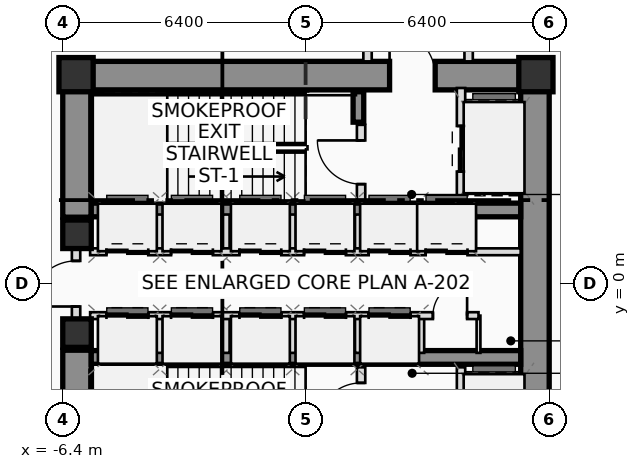
"""IFC4 building model, lengths in metres.
Left out: names, types, materials, properties, quantities, classifications, styles, units other than length and angle.
Written with IfcOpenShell. Run it as: python <this file> out.ifc"""

import sys

from ifc_helpers import new_model, si_unit, direction, frame, frame_2d, origin, origin_2d, place, context, subcontext, project, spatial, rectangle, extrude, source, transform, mapped, element, fill, save


model = new_model("IFC4")
c1 = context("Model", 3, precision=1e-05, world=origin(), true_north=direction((0.0, 1.0)))
c2 = subcontext(c1, "Body", "Model", "MODEL_VIEW")
j1 = project(units=[si_unit("LENGTHUNIT", "METRE"), si_unit("PLANEANGLEUNIT", "RADIAN")], contexts=[c1])
p1 = place(None, origin())
s1 = spatial("IfcSite", under=j1, at=p1, CompositionType="ELEMENT")
p2 = place(p1, origin())
s2 = spatial("IfcBuilding", under=s1, at=p2, CompositionType="ELEMENT")
p3 = place(p2, origin())
s3 = spatial("IfcBuildingStorey", under=s2, at=p3, CompositionType="ELEMENT", Elevation=0.0)
m1 = source(origin(), c2, "Body", "SweptSolid", [
    extrude(rectangle(XDim=0.9, YDim=0.9, at=origin_2d()), origin(), (0.0, 0.0, 1.0), 4.5),
])
for number, where, z_axis, x_axis in (
    (1, (6.05, 5.5, 0.0), (0.0, 0.0, 1.0), (1.0, 0.0, 0.0)),
    (2, (-6.05, 5.5, 0.0), (0.0, 0.0, 1.0), (1.0, 0.0, 0.0)),
):
    element("IfcColumn", number, at=place(p3, frame(where, z_axis=z_axis, x_axis=x_axis)), inside=s3, PredefinedType="COLUMN", context=c2, shape_type="MappedRepresentation", body=[
        mapped(m1, transform((0.0, 0.0, 0.0), scale=1.0)),
    ])
p4 = place(p3, frame((-6.4, 5.475, 0.0), z_axis=(0.0, 0.0, 1.0), x_axis=(1.0, 0.0, 0.0)))
e3 = element("IfcWall", 3, at=p4, inside=s3, PredefinedType="SHEAR", context=c2, shape_type="SweptSolid", body=[
    extrude(rectangle(XDim=12.8, YDim=0.75, at=frame_2d((6.4, 0.0))), origin(), (0.0, 0.0, 1.0), 4.5),
])
p5 = place(p4, frame((8.6, 0.0, 0.0)))
e4 = element("IfcOpeningElement", 4, at=p5, cuts=e3, PredefinedType="OPENING", context=c2, shape_type="SweptSolid", body=[
    extrude(rectangle(XDim=1.2, YDim=2.2, at=frame_2d((0.6, 1.1))), frame((0.0, 0.385, 0.0), z_axis=(0.0, -1.0, 0.0), x_axis=(1.0, 0.0, 0.0)), (0.0, 0.0, 1.0), 0.77),
])
p6 = place(p3, frame((6.025, -5.1, 0.0), z_axis=(0.0, 0.0, 1.0), x_axis=(0.0, 1.0, 0.0)))
e5 = element("IfcWall", 5, at=p6, inside=s3, PredefinedType="SHEAR", context=c2, shape_type="SweptSolid", body=[
    extrude(rectangle(XDim=10.2, YDim=0.75, at=frame_2d((5.1, 0.0))), origin(), (0.0, 0.0, 1.0), 4.5),
])
for number, where, z_axis, x_axis in (
    (6, (-6.025, -5.1, 0.0), (0.0, 0.0, 1.0), (0.0, 1.0, 0.0)),
    (7, (-6.025, 1.75, 0.0), (0.0, 0.0, 1.0), (0.0, 1.0, 0.0)),
):
    element("IfcWall", number, at=place(p3, frame(where, z_axis=z_axis, x_axis=x_axis)), inside=s3, PredefinedType="SHEAR", context=c2, shape_type="SweptSolid", body=[
        extrude(rectangle(XDim=3.35, YDim=0.75, at=frame_2d((1.675, 0.0))), origin(), (0.0, 0.0, 1.0), 4.5),
    ])
for number, where, z_axis, x_axis in (
    (8, (-5.65, 1.94, 0.0), (0.0, 0.0, 1.0), (1.0, 0.0, 0.0)),
    (9, (-5.65, -1.94, 0.0), (0.0, 0.0, 1.0), (1.0, 0.0, 0.0)),
):
    element("IfcWall", number, at=place(p3, frame(where, z_axis=z_axis, x_axis=x_axis)), inside=s3, PredefinedType="SHEAR", context=c2, shape_type="SweptSolid", body=[
        extrude(rectangle(XDim=11.3, YDim=0.36, at=frame_2d((5.65, 0.0))), origin(), (0.0, 0.0, 1.0), 4.5),
    ])
p7 = place(p3, frame((-5.52, 2.3, 0.0), z_axis=(0.0, 0.0, 1.0), x_axis=(0.0, 1.0, 0.0)))
e10 = element("IfcWall", 10, at=p7, inside=s3, PredefinedType="SHEAR", context=c2, shape_type="SweptSolid", body=[
    extrude(rectangle(XDim=2.75, YDim=0.28, at=frame_2d((1.375, 0.0))), origin(), (0.0, 0.0, 1.0), 4.5),
])
p8 = place(p3, frame((1.38, 4.25, 0.0), z_axis=(0.0, 0.0, 1.0), x_axis=(0.0, 1.0, 0.0)))
e11 = element("IfcWall", 11, at=p8, inside=s3, PredefinedType="SHEAR", context=c2, shape_type="SweptSolid", body=[
    extrude(rectangle(XDim=0.8, YDim=0.28, at=frame_2d((0.4, 0.0))), origin(), (0.0, 0.0, 1.0), 4.5),
])
p9 = place(p3, frame((-5.52, -5.05, 0.0), z_axis=(0.0, 0.0, 1.0), x_axis=(0.0, 1.0, 0.0)))
e12 = element("IfcWall", 12, at=p9, inside=s3, PredefinedType="SHEAR", context=c2, shape_type="SweptSolid", body=[
    extrude(rectangle(XDim=2.75, YDim=0.28, at=frame_2d((1.375, 0.0))), origin(), (0.0, 0.0, 1.0), 4.5),
])
m2 = source(origin(), c2, "Body", "SweptSolid", [
    extrude(rectangle(XDim=0.75, YDim=0.75, at=origin_2d()), origin(), (0.0, 0.0, 1.0), 4.5),
])
for number, where, z_axis, x_axis in (
    (13, (-6.025, -1.3, 0.0), (0.0, 0.0, 1.0), (1.0, 0.0, 0.0)),
    (14, (-6.025, 1.3, 0.0), (0.0, 0.0, 1.0), (1.0, 0.0, 0.0)),
):
    element("IfcColumn", number, at=place(p3, frame(where, z_axis=z_axis, x_axis=x_axis)), inside=s3, PredefinedType="COLUMN", context=c2, shape_type="MappedRepresentation", body=[
        mapped(m2, transform((0.0, 0.0, 0.0), scale=1.0)),
    ])
p10 = place(p3, frame((-6.05, -0.95, 0.0), z_axis=(0.0, 0.0, 1.0), x_axis=(0.0, 1.0, 0.0)))
e15 = element("IfcWall", 15, at=p10, inside=s3, PredefinedType="PLUMBINGWALL", context=c2, shape_type="SweptSolid", body=[
    extrude(rectangle(XDim=1.9, YDim=0.22, at=frame_2d((0.95, 0.0))), origin(), (0.0, 0.0, 1.0), 3.15),
])
p11 = place(p10, frame((0.35, 0.0, 0.0)))
e16 = element("IfcOpeningElement", 16, at=p11, cuts=e15, PredefinedType="OPENING", context=c2, shape_type="SweptSolid", body=[
    extrude(rectangle(XDim=1.2, YDim=2.2, at=frame_2d((0.6, 1.1))), frame((0.0, 0.12, 0.0), z_axis=(0.0, -1.0, 0.0), x_axis=(1.0, 0.0, 0.0)), (0.0, 0.0, 1.0), 0.24),
])
p12 = place(p3, frame((1.45, 2.2, 0.0), z_axis=(0.0, 0.0, 1.0), x_axis=(0.0, 1.0, 0.0)))
e17 = element("IfcWall", 17, at=p12, inside=s3, PredefinedType="PLUMBINGWALL", context=c2, shape_type="SweptSolid", body=[
    extrude(rectangle(XDim=1.98, YDim=0.22, at=frame_2d((0.99, 0.0))), origin(), (0.0, 0.0, 1.0), 4.17),
])
p13 = place(p12, frame((0.42, 0.0, 0.0)))
e18 = element("IfcOpeningElement", 18, at=p13, cuts=e17, PredefinedType="OPENING", context=c2, shape_type="SweptSolid", body=[
    extrude(rectangle(XDim=1.15, YDim=2.15, at=frame_2d((0.575, 1.075))), frame((0.0, 0.12, 0.0), z_axis=(0.0, -1.0, 0.0), x_axis=(1.0, 0.0, 0.0)), (0.0, 0.0, 1.0), 0.24),
])
p14 = place(p3, frame((4.08, 2.2, 0.0), z_axis=(0.0, 0.0, 1.0), x_axis=(0.0, 1.0, 0.0)))
e19 = element("IfcWall", 19, at=p14, inside=s3, PredefinedType="PLUMBINGWALL", context=c2, shape_type="SweptSolid", body=[
    extrude(rectangle(XDim=2.95, YDim=0.22, at=frame_2d((1.475, 0.0))), origin(), (0.0, 0.0, 1.0), 4.17),
])
p15 = place(p14, frame((0.75, 0.0, 0.0)))
e20 = element("IfcOpeningElement", 20, at=p15, cuts=e19, PredefinedType="OPENING", context=c2, shape_type="SweptSolid", body=[
    extrude(rectangle(XDim=1.2, YDim=2.25, at=frame_2d((0.6, 1.125))), frame((0.0, 0.12, 0.0), z_axis=(0.0, -1.0, 0.0), x_axis=(1.0, 0.0, 0.0)), (0.0, 0.0, 1.0), 0.24),
])
p16 = place(p3, frame((1.45, -4.18, 0.0), z_axis=(0.0, 0.0, 1.0), x_axis=(0.0, 1.0, 0.0)))
e21 = element("IfcWall", 21, at=p16, inside=s3, PredefinedType="PLUMBINGWALL", context=c2, shape_type="SweptSolid", body=[
    extrude(rectangle(XDim=1.98, YDim=0.22, at=frame_2d((0.99, 0.0))), origin(), (0.0, 0.0, 1.0), 4.17),
])
p17 = place(p16, frame((0.42, 0.0, 0.0)))
e22 = element("IfcOpeningElement", 22, at=p17, cuts=e21, PredefinedType="OPENING", context=c2, shape_type="SweptSolid", body=[
    extrude(rectangle(XDim=1.15, YDim=2.15, at=frame_2d((0.575, 1.075))), frame((0.0, 0.12, 0.0), z_axis=(0.0, -1.0, 0.0), x_axis=(1.0, 0.0, 0.0)), (0.0, 0.0, 1.0), 0.24),
])
p18 = place(p3, frame((4.08, -5.15, 0.0), z_axis=(0.0, 0.0, 1.0), x_axis=(0.0, 1.0, 0.0)))
e23 = element("IfcWall", 23, at=p18, inside=s3, PredefinedType="PLUMBINGWALL", context=c2, shape_type="SweptSolid", body=[
    extrude(rectangle(XDim=2.95, YDim=0.22, at=frame_2d((1.475, 0.0))), origin(), (0.0, 0.0, 1.0), 4.17),
])
p19 = place(p18, frame((0.95, 0.0, 0.0)))
e24 = element("IfcOpeningElement", 24, at=p19, cuts=e23, PredefinedType="OPENING", context=c2, shape_type="SweptSolid", body=[
    extrude(rectangle(XDim=1.2, YDim=2.25, at=frame_2d((0.6, 1.125))), frame((0.0, 0.12, 0.0), z_axis=(0.0, -1.0, 0.0), x_axis=(1.0, 0.0, 0.0)), (0.0, 0.0, 1.0), 0.24),
])
for number, where, z_axis, x_axis in (
    (25, (-3.85, 0.84, 0.0), (0.0, 0.0, 1.0), (0.0, 1.0, 0.0)),
    (26, (-3.85, -1.82, 0.0), (0.0, 0.0, 1.0), (0.0, 1.0, 0.0)),
    (27, (-2.1, 0.84, 0.0), (0.0, 0.0, 1.0), (0.0, 1.0, 0.0)),
    (28, (-2.1, -1.82, 0.0), (0.0, 0.0, 1.0), (0.0, 1.0, 0.0)),
    (29, (-0.35, 0.84, 0.0), (0.0, 0.0, 1.0), (0.0, 1.0, 0.0)),
    (30, (-0.35, -1.82, 0.0), (0.0, 0.0, 1.0), (0.0, 1.0, 0.0)),
    (31, (1.38, 0.84, 0.0), (0.0, 0.0, 1.0), (0.0, 1.0, 0.0)),
    (32, (1.38, -1.82, 0.0), (0.0, 0.0, 1.0), (0.0, 1.0, 0.0)),
    (33, (3.02, 0.84, 0.0), (0.0, 0.0, 1.0), (0.0, 1.0, 0.0)),
    (34, (4.38, 0.84, 0.0), (0.0, 0.0, 1.0), (0.0, 1.0, 0.0)),
    (35, (3.02, -1.82, 0.0), (0.0, 0.0, 1.0), (0.0, 1.0, 0.0)),
):
    element("IfcWall", number, at=place(p3, frame(where, z_axis=z_axis, x_axis=x_axis)), inside=s3, PredefinedType="PLUMBINGWALL", context=c2, shape_type="SweptSolid", body=[
        extrude(rectangle(XDim=0.98, YDim=0.18, at=frame_2d((0.49, 0.0))), origin(), (0.0, 0.0, 1.0), 4.17),
    ])
p20 = place(p3, frame((4.54, -1.82, 0.0), z_axis=(0.0, 0.0, 1.0), x_axis=(0.0, 1.0, 0.0)))
e36 = element("IfcWall", 36, at=p20, inside=s3, PredefinedType="PARTITIONING", context=c2, shape_type="SweptSolid", body=[
    extrude(rectangle(XDim=0.98, YDim=0.1, at=frame_2d((0.49, 0.0))), origin(), (0.0, 0.0, 1.0), 4.17),
])
p21 = place(p3, frame((-5.68, 0.84, 0.0), z_axis=(0.0, 0.0, 1.0), x_axis=(1.0, 0.0, 0.0)))
e37 = element("IfcWall", 37, at=p21, inside=s3, PredefinedType="PLUMBINGWALL", context=c2, shape_type="SweptSolid", body=[
    extrude(rectangle(XDim=11.33, YDim=0.18, at=frame_2d((5.665, 0.0))), origin(), (0.0, 0.0, 1.0), 4.17),
])
p22 = place(p21, frame((0.43, 0.0, 0.0)))
e38 = element("IfcOpeningElement", 38, at=p22, cuts=e37, PredefinedType="OPENING", context=c2, shape_type="SweptSolid", body=[
    extrude(rectangle(XDim=1.1, YDim=2.2, at=frame_2d((0.55, 1.1))), frame((0.0, 0.1, 0.0), z_axis=(0.0, -1.0, 0.0), x_axis=(1.0, 0.0, 0.0)), (0.0, 0.0, 1.0), 0.2),
])
p23 = place(p21, frame((2.13, 0.0, 0.0)))
e39 = element("IfcOpeningElement", 39, at=p23, cuts=e37, PredefinedType="OPENING", context=c2, shape_type="SweptSolid", body=[
    extrude(rectangle(XDim=1.1, YDim=2.2, at=frame_2d((0.55, 1.1))), frame((0.0, 0.1, 0.0), z_axis=(0.0, -1.0, 0.0), x_axis=(1.0, 0.0, 0.0)), (0.0, 0.0, 1.0), 0.2),
])
p24 = place(p21, frame((3.93, 0.0, 0.0)))
e40 = element("IfcOpeningElement", 40, at=p24, cuts=e37, PredefinedType="OPENING", context=c2, shape_type="SweptSolid", body=[
    extrude(rectangle(XDim=1.1, YDim=2.2, at=frame_2d((0.55, 1.1))), frame((0.0, 0.1, 0.0), z_axis=(0.0, -1.0, 0.0), x_axis=(1.0, 0.0, 0.0)), (0.0, 0.0, 1.0), 0.2),
])
p25 = place(p21, frame((5.63, 0.0, 0.0)))
e41 = element("IfcOpeningElement", 41, at=p25, cuts=e37, PredefinedType="OPENING", context=c2, shape_type="SweptSolid", body=[
    extrude(rectangle(XDim=1.1, YDim=2.2, at=frame_2d((0.55, 1.1))), frame((0.0, 0.1, 0.0), z_axis=(0.0, -1.0, 0.0), x_axis=(1.0, 0.0, 0.0)), (0.0, 0.0, 1.0), 0.2),
])
p26 = place(p21, frame((7.33, 0.0, 0.0)))
e42 = element("IfcOpeningElement", 42, at=p26, cuts=e37, PredefinedType="OPENING", context=c2, shape_type="SweptSolid", body=[
    extrude(rectangle(XDim=1.1, YDim=2.2, at=frame_2d((0.55, 1.1))), frame((0.0, 0.1, 0.0), z_axis=(0.0, -1.0, 0.0), x_axis=(1.0, 0.0, 0.0)), (0.0, 0.0, 1.0), 0.2),
])
p27 = place(p21, frame((8.83, 0.0, 0.0)))
e43 = element("IfcOpeningElement", 43, at=p27, cuts=e37, PredefinedType="OPENING", context=c2, shape_type="SweptSolid", body=[
    extrude(rectangle(XDim=1.1, YDim=2.2, at=frame_2d((0.55, 1.1))), frame((0.0, 0.1, 0.0), z_axis=(0.0, -1.0, 0.0), x_axis=(1.0, 0.0, 0.0)), (0.0, 0.0, 1.0), 0.2),
])
p28 = place(p3, frame((-5.68, -0.84, 0.0), z_axis=(0.0, 0.0, 1.0), x_axis=(1.0, 0.0, 0.0)))
e44 = element("IfcWall", 44, at=p28, inside=s3, PredefinedType="PLUMBINGWALL", context=c2, shape_type="SweptSolid", body=[
    extrude(rectangle(XDim=10.22, YDim=0.18, at=frame_2d((5.11, 0.0))), origin(), (0.0, 0.0, 1.0), 4.17),
])
p29 = place(p28, frame((0.43, 0.0, 0.0)))
e45 = element("IfcOpeningElement", 45, at=p29, cuts=e44, PredefinedType="OPENING", context=c2, shape_type="SweptSolid", body=[
    extrude(rectangle(XDim=1.1, YDim=2.2, at=frame_2d((0.55, 1.1))), frame((0.0, 0.1, 0.0), z_axis=(0.0, -1.0, 0.0), x_axis=(1.0, 0.0, 0.0)), (0.0, 0.0, 1.0), 0.2),
])
p30 = place(p28, frame((2.13, 0.0, 0.0)))
e46 = element("IfcOpeningElement", 46, at=p30, cuts=e44, PredefinedType="OPENING", context=c2, shape_type="SweptSolid", body=[
    extrude(rectangle(XDim=1.1, YDim=2.2, at=frame_2d((0.55, 1.1))), frame((0.0, 0.1, 0.0), z_axis=(0.0, -1.0, 0.0), x_axis=(1.0, 0.0, 0.0)), (0.0, 0.0, 1.0), 0.2),
])
p31 = place(p28, frame((3.93, 0.0, 0.0)))
e47 = element("IfcOpeningElement", 47, at=p31, cuts=e44, PredefinedType="OPENING", context=c2, shape_type="SweptSolid", body=[
    extrude(rectangle(XDim=1.1, YDim=2.2, at=frame_2d((0.55, 1.1))), frame((0.0, 0.1, 0.0), z_axis=(0.0, -1.0, 0.0), x_axis=(1.0, 0.0, 0.0)), (0.0, 0.0, 1.0), 0.2),
])
p32 = place(p28, frame((5.63, 0.0, 0.0)))
e48 = element("IfcOpeningElement", 48, at=p32, cuts=e44, PredefinedType="OPENING", context=c2, shape_type="SweptSolid", body=[
    extrude(rectangle(XDim=1.1, YDim=2.2, at=frame_2d((0.55, 1.1))), frame((0.0, 0.1, 0.0), z_axis=(0.0, -1.0, 0.0), x_axis=(1.0, 0.0, 0.0)), (0.0, 0.0, 1.0), 0.2),
])
p33 = place(p28, frame((7.33, 0.0, 0.0)))
e49 = element("IfcOpeningElement", 49, at=p33, cuts=e44, PredefinedType="OPENING", context=c2, shape_type="SweptSolid", body=[
    extrude(rectangle(XDim=1.1, YDim=2.2, at=frame_2d((0.55, 1.1))), frame((0.0, 0.1, 0.0), z_axis=(0.0, -1.0, 0.0), x_axis=(1.0, 0.0, 0.0)), (0.0, 0.0, 1.0), 0.2),
])
p34 = place(p28, frame((9.02, 0.0, 0.0)))
e50 = element("IfcOpeningElement", 50, at=p34, cuts=e44, PredefinedType="OPENING", context=c2, shape_type="SweptSolid", body=[
    extrude(rectangle(XDim=0.9, YDim=2.05, at=frame_2d((0.45, 1.025))), frame((0.0, 0.1, 0.0), z_axis=(0.0, -1.0, 0.0), x_axis=(1.0, 0.0, 0.0)), (0.0, 0.0, 1.0), 0.2),
])
p35 = place(p3, frame((1.62, 5.85, 0.0), z_axis=(0.0, 0.0, 1.0), x_axis=(0.0, 1.0, 0.0)))
e51 = element("IfcWall", 51, at=p35, inside=s3, PredefinedType="PLUMBINGWALL", context=c2, shape_type="SweptSolid", body=[
    extrude(rectangle(XDim=23.5, YDim=0.22, at=frame_2d((11.75, 0.0))), origin(), (0.0, 0.0, 1.0), 3.275),
])
p36 = place(p3, frame((4.28, 5.85, 0.0), z_axis=(0.0, 0.0, 1.0), x_axis=(0.0, 1.0, 0.0)))
e52 = element("IfcWall", 52, at=p36, inside=s3, PredefinedType="PLUMBINGWALL", context=c2, shape_type="SweptSolid", body=[
    extrude(rectangle(XDim=23.5, YDim=0.22, at=frame_2d((11.75, 0.0))), origin(), (0.0, 0.0, 1.0), 3.275),
])
p37 = place(p36, frame((3.5, 0.0, 0.0)))
e53 = element("IfcOpeningElement", 53, at=p37, cuts=e52, PredefinedType="OPENING", context=c2, shape_type="SweptSolid", body=[
    extrude(rectangle(XDim=1.2, YDim=2.2, at=frame_2d((0.6, 1.1))), frame((0.0, 0.12, 0.0), z_axis=(0.0, -1.0, 0.0), x_axis=(1.0, 0.0, 0.0)), (0.0, 0.0, 1.0), 0.24),
])
p38 = place(p5, origin())
e54 = element("IfcDoor", 54, at=p38, inside=s3, OperationType="SINGLE_SWING_LEFT", PredefinedType="DOOR", context=c2, shape_type="SweptSolid", body=[
    extrude(rectangle(XDim=1.2, YDim=2.2, at=frame_2d((0.6, 1.1))), frame((0.0, 0.025, 0.0), z_axis=(0.0, -1.0, 0.0), x_axis=(1.0, 0.0, 0.0)), (0.0, 0.0, 1.0), 0.05),
])
fill(e4, e54)
p39 = place(p11, origin())
e55 = element("IfcDoor", 55, at=p39, inside=s3, OperationType="SINGLE_SWING_LEFT", PredefinedType="DOOR", context=c2, shape_type="SweptSolid", body=[
    extrude(rectangle(XDim=1.2, YDim=2.2, at=frame_2d((0.6, 1.1))), frame((0.0, 0.025, 0.0), z_axis=(0.0, -1.0, 0.0), x_axis=(1.0, 0.0, 0.0)), (0.0, 0.0, 1.0), 0.05),
])
fill(e16, e55)
p40 = place(p13, origin())
e56 = element("IfcDoor", 56, at=p40, inside=s3, OperationType="SINGLE_SWING_RIGHT", PredefinedType="DOOR", context=c2, shape_type="SweptSolid", body=[
    extrude(rectangle(XDim=1.15, YDim=2.15, at=frame_2d((0.575, 1.075))), frame((0.0, 0.025, 0.0), z_axis=(0.0, -1.0, 0.0), x_axis=(1.0, 0.0, 0.0)), (0.0, 0.0, 1.0), 0.05),
])
fill(e18, e56)
p41 = place(p15, origin())
e57 = element("IfcDoor", 57, at=p41, inside=s3, OperationType="DOUBLE_DOOR_SLIDING", PredefinedType="DOOR", context=c2, shape_type="SweptSolid", body=[
    extrude(rectangle(XDim=1.2, YDim=2.25, at=frame_2d((0.6, 1.125))), frame((0.0, 0.025, 0.0), z_axis=(0.0, -1.0, 0.0), x_axis=(1.0, 0.0, 0.0)), (0.0, 0.0, 1.0), 0.05),
])
fill(e20, e57)
p42 = place(p17, origin())
e58 = element("IfcDoor", 58, at=p42, inside=s3, OperationType="SINGLE_SWING_LEFT", PredefinedType="DOOR", context=c2, shape_type="SweptSolid", body=[
    extrude(rectangle(XDim=1.15, YDim=2.15, at=frame_2d((0.575, 1.075))), frame((0.0, 0.025, 0.0), z_axis=(0.0, -1.0, 0.0), x_axis=(1.0, 0.0, 0.0)), (0.0, 0.0, 1.0), 0.05),
])
fill(e22, e58)
p43 = place(p22, origin())
e59 = element("IfcDoor", 59, at=p43, inside=s3, OperationType="DOUBLE_DOOR_SLIDING", PredefinedType="DOOR", context=c2, shape_type="SweptSolid", body=[
    extrude(rectangle(XDim=1.1, YDim=2.2, at=frame_2d((0.55, 1.1))), frame((0.0, 0.025, 0.0), z_axis=(0.0, -1.0, 0.0), x_axis=(1.0, 0.0, 0.0)), (0.0, 0.0, 1.0), 0.05),
])
fill(e38, e59)
p44 = place(p23, origin())
e60 = element("IfcDoor", 60, at=p44, inside=s3, OperationType="DOUBLE_DOOR_SLIDING", PredefinedType="DOOR", context=c2, shape_type="SweptSolid", body=[
    extrude(rectangle(XDim=1.1, YDim=2.2, at=frame_2d((0.55, 1.1))), frame((0.0, 0.025, 0.0), z_axis=(0.0, -1.0, 0.0), x_axis=(1.0, 0.0, 0.0)), (0.0, 0.0, 1.0), 0.05),
])
fill(e39, e60)
p45 = place(p24, origin())
e61 = element("IfcDoor", 61, at=p45, inside=s3, OperationType="DOUBLE_DOOR_SLIDING", PredefinedType="DOOR", context=c2, shape_type="SweptSolid", body=[
    extrude(rectangle(XDim=1.1, YDim=2.2, at=frame_2d((0.55, 1.1))), frame((0.0, 0.025, 0.0), z_axis=(0.0, -1.0, 0.0), x_axis=(1.0, 0.0, 0.0)), (0.0, 0.0, 1.0), 0.05),
])
fill(e40, e61)
p46 = place(p25, origin())
e62 = element("IfcDoor", 62, at=p46, inside=s3, OperationType="DOUBLE_DOOR_SLIDING", PredefinedType="DOOR", context=c2, shape_type="SweptSolid", body=[
    extrude(rectangle(XDim=1.1, YDim=2.2, at=frame_2d((0.55, 1.1))), frame((0.0, 0.025, 0.0), z_axis=(0.0, -1.0, 0.0), x_axis=(1.0, 0.0, 0.0)), (0.0, 0.0, 1.0), 0.05),
])
fill(e41, e62)
p47 = place(p26, origin())
e63 = element("IfcDoor", 63, at=p47, inside=s3, OperationType="DOUBLE_DOOR_SLIDING", PredefinedType="DOOR", context=c2, shape_type="SweptSolid", body=[
    extrude(rectangle(XDim=1.1, YDim=2.2, at=frame_2d((0.55, 1.1))), frame((0.0, 0.025, 0.0), z_axis=(0.0, -1.0, 0.0), x_axis=(1.0, 0.0, 0.0)), (0.0, 0.0, 1.0), 0.05),
])
fill(e42, e63)
p48 = place(p27, origin())
e64 = element("IfcDoor", 64, at=p48, inside=s3, OperationType="DOUBLE_DOOR_SLIDING", PredefinedType="DOOR", context=c2, shape_type="SweptSolid", body=[
    extrude(rectangle(XDim=1.1, YDim=2.2, at=frame_2d((0.55, 1.1))), frame((0.0, 0.025, 0.0), z_axis=(0.0, -1.0, 0.0), x_axis=(1.0, 0.0, 0.0)), (0.0, 0.0, 1.0), 0.05),
])
fill(e43, e64)
p49 = place(p29, origin())
e65 = element("IfcDoor", 65, at=p49, inside=s3, OperationType="DOUBLE_DOOR_SLIDING", PredefinedType="DOOR", context=c2, shape_type="SweptSolid", body=[
    extrude(rectangle(XDim=1.1, YDim=2.2, at=frame_2d((0.55, 1.1))), frame((0.0, 0.025, 0.0), z_axis=(0.0, -1.0, 0.0), x_axis=(1.0, 0.0, 0.0)), (0.0, 0.0, 1.0), 0.05),
])
fill(e45, e65)
p50 = place(p30, origin())
e66 = element("IfcDoor", 66, at=p50, inside=s3, OperationType="DOUBLE_DOOR_SLIDING", PredefinedType="DOOR", context=c2, shape_type="SweptSolid", body=[
    extrude(rectangle(XDim=1.1, YDim=2.2, at=frame_2d((0.55, 1.1))), frame((0.0, 0.025, 0.0), z_axis=(0.0, -1.0, 0.0), x_axis=(1.0, 0.0, 0.0)), (0.0, 0.0, 1.0), 0.05),
])
fill(e46, e66)
p51 = place(p31, origin())
e67 = element("IfcDoor", 67, at=p51, inside=s3, OperationType="DOUBLE_DOOR_SLIDING", PredefinedType="DOOR", context=c2, shape_type="SweptSolid", body=[
    extrude(rectangle(XDim=1.1, YDim=2.2, at=frame_2d((0.55, 1.1))), frame((0.0, 0.025, 0.0), z_axis=(0.0, -1.0, 0.0), x_axis=(1.0, 0.0, 0.0)), (0.0, 0.0, 1.0), 0.05),
])
fill(e47, e67)
p52 = place(p32, origin())
e68 = element("IfcDoor", 68, at=p52, inside=s3, OperationType="DOUBLE_DOOR_SLIDING", PredefinedType="DOOR", context=c2, shape_type="SweptSolid", body=[
    extrude(rectangle(XDim=1.1, YDim=2.2, at=frame_2d((0.55, 1.1))), frame((0.0, 0.025, 0.0), z_axis=(0.0, -1.0, 0.0), x_axis=(1.0, 0.0, 0.0)), (0.0, 0.0, 1.0), 0.05),
])
fill(e48, e68)
p53 = place(p33, origin())
e69 = element("IfcDoor", 69, at=p53, inside=s3, OperationType="DOUBLE_DOOR_SLIDING", PredefinedType="DOOR", context=c2, shape_type="SweptSolid", body=[
    extrude(rectangle(XDim=1.1, YDim=2.2, at=frame_2d((0.55, 1.1))), frame((0.0, 0.025, 0.0), z_axis=(0.0, -1.0, 0.0), x_axis=(1.0, 0.0, 0.0)), (0.0, 0.0, 1.0), 0.05),
])
fill(e49, e69)
p54 = place(p34, origin())
e70 = element("IfcDoor", 70, at=p54, inside=s3, OperationType="SINGLE_SWING_RIGHT", PredefinedType="DOOR", context=c2, shape_type="SweptSolid", body=[
    extrude(rectangle(XDim=0.9, YDim=2.05, at=frame_2d((0.45, 1.025))), frame((0.0, 0.025, 0.0), z_axis=(0.0, -1.0, 0.0), x_axis=(1.0, 0.0, 0.0)), (0.0, 0.0, 1.0), 0.05),
])
fill(e50, e70)
save(model, sys.argv[1])
